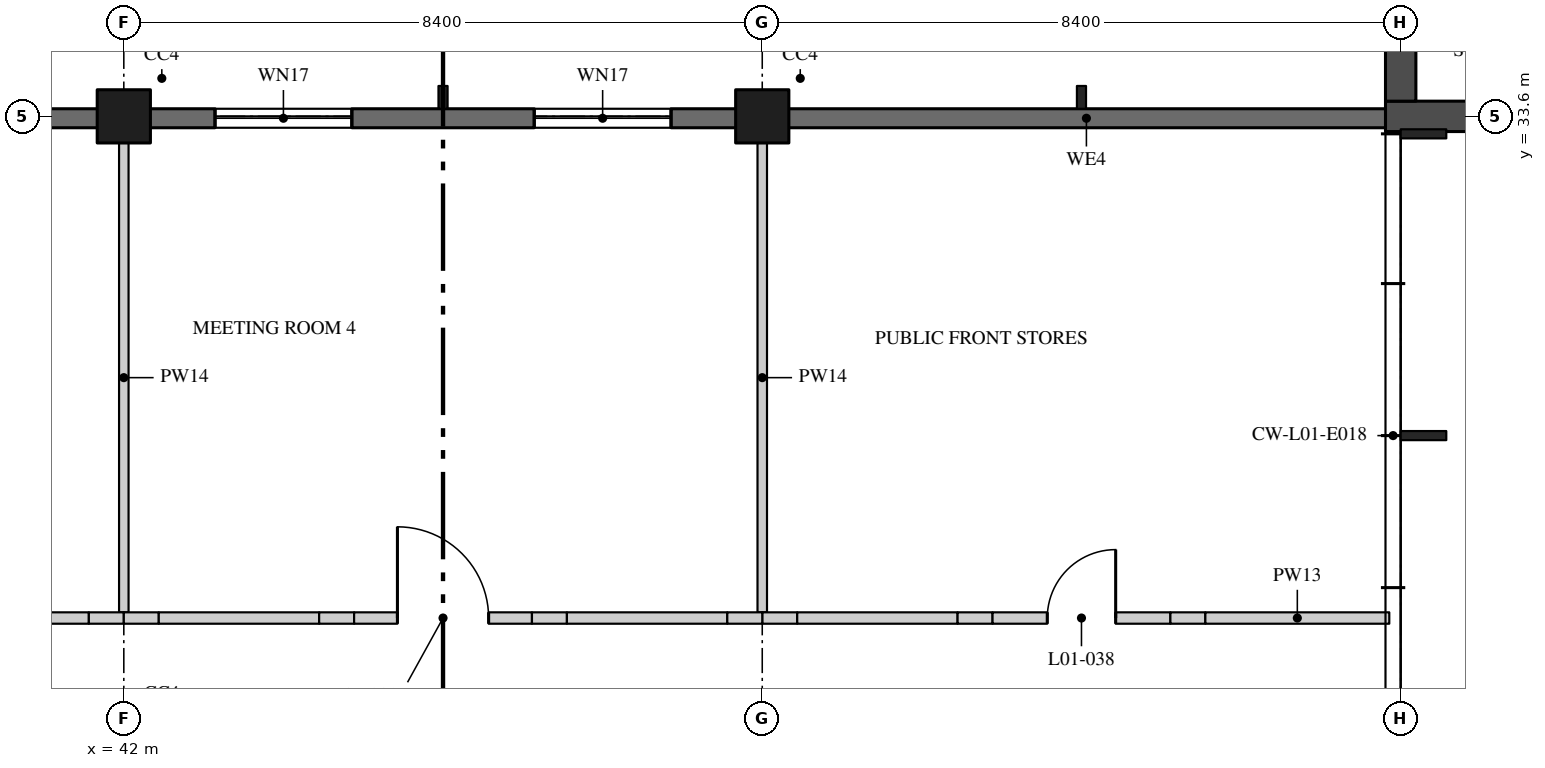
"""IFC4 building model, lengths in metres.
Left out: names, types, materials, properties, quantities, classifications, styles, units other than length and angle.
Written with IfcOpenShell. Run it as: python <this file> out.ifc"""

import sys

from ifc_helpers import new_model, si_unit, direction, frame, frame_2d, origin, origin_2d, place, context, subcontext, project, spatial, rectangle, extrude, element, fill, save


model = new_model("IFC4")
c1 = context("Model", 3, precision=1e-05, world=origin(), true_north=direction((0.0, 1.0)))
c2 = subcontext(c1, "Body", "Model", "MODEL_VIEW")
j1 = project(units=[si_unit("LENGTHUNIT", "METRE"), si_unit("PLANEANGLEUNIT", "RADIAN")], contexts=[c1])
p1 = place(None, origin())
s1 = spatial("IfcSite", under=j1, at=p1, CompositionType="ELEMENT")
p2 = place(p1, origin())
s2 = spatial("IfcBuilding", under=s1, at=p2, CompositionType="ELEMENT")
p3 = place(p2, frame((0.0, 0.0, 5.4)))
s3 = spatial("IfcBuildingStorey", under=s2, at=p3, CompositionType="ELEMENT", Elevation=5.4)
for number, where, z_axis, x_axis in (
    (1, (42.0, 33.6, 0.0), (0.0, 0.0, 1.0), (1.0, 0.0, 0.0)),
    (2, (50.4, 33.6, 0.0), (0.0, 0.0, 1.0), (1.0, 0.0, 0.0)),
):
    element("IfcColumn", number, at=place(p3, frame(where, z_axis=z_axis, x_axis=x_axis)), inside=s3, PredefinedType="COLUMN", context=c2, shape_type="SweptSolid", body=[
        extrude(rectangle(XDim=0.7, YDim=0.7, at=origin_2d()), origin(), (0.0, 0.0, 1.0), 4.37),
    ])
p4 = place(p3, frame((58.6, 33.6, 0.0), z_axis=(0.0, 0.0, 1.0), x_axis=(1.0, 0.0, 0.0)))
e3 = element("IfcWall", 3, at=p4, inside=s3, PredefinedType="SHEAR", context=c2, shape_type="SweptSolid", body=[
    extrude(rectangle(XDim=8.8, YDim=0.4, at=frame_2d((4.4, 0.0))), origin(), (0.0, 0.0, 1.0), 4.25),
])
p5 = place(p3, frame((58.8, 33.8, 0.0), z_axis=(0.0, 0.0, 1.0), x_axis=(0.0, 1.0, 0.0)))
e4 = element("IfcWall", 4, at=p5, inside=s3, PredefinedType="SHEAR", context=c2, shape_type="SweptSolid", body=[
    extrude(rectangle(XDim=8.0, YDim=0.4, at=frame_2d((4.0, 0.0))), origin(), (0.0, 0.0, 1.0), 4.25),
])
p6 = place(p3, frame((42.0, 27.075, 0.0), z_axis=(0.0, 0.0, 1.0), x_axis=(0.0, 1.0, 0.0)))
e5 = element("IfcWall", 5, at=p6, inside=s3, PredefinedType="PARTITIONING", context=c2, shape_type="SweptSolid", body=[
    extrude(rectangle(XDim=6.175, YDim=0.125, at=frame_2d((3.087, 0.0))), origin(), (0.0, 0.0, 1.0), 3.746),
])
p7 = place(p3, frame((39.43, 27.0, 0.0), z_axis=(0.0, 0.0, 1.0), x_axis=(1.0, 0.0, 0.0)))
e6 = element("IfcWall", 6, at=p7, inside=s3, PredefinedType="PARTITIONING", context=c2, shape_type="SweptSolid", body=[
    extrude(rectangle(XDim=2.11, YDim=0.15, at=frame_2d((1.055, 0.0))), origin(), (0.0, 0.0, 1.0), 4.37),
])
p8 = place(p3, frame((41.54, 27.0, 0.0), z_axis=(0.0, 0.0, 1.0), x_axis=(1.0, 0.0, 0.0)))
e7 = element("IfcWall", 7, at=p8, inside=s3, PredefinedType="PARTITIONING", context=c2, shape_type="SweptSolid", body=[
    extrude(rectangle(XDim=0.46, YDim=0.15, at=frame_2d((0.23, 0.0))), origin(), (0.0, 0.0, 1.0), 3.746),
])
p9 = place(p3, frame((50.4, 27.075, 0.0), z_axis=(0.0, 0.0, 1.0), x_axis=(0.0, 1.0, 0.0)))
e8 = element("IfcWall", 8, at=p9, inside=s3, PredefinedType="PARTITIONING", context=c2, shape_type="SweptSolid", body=[
    extrude(rectangle(XDim=6.175, YDim=0.125, at=frame_2d((3.087, 0.0))), origin(), (0.0, 0.0, 1.0), 3.746),
])
p10 = place(p3, frame((50.4, 27.0, 0.0), z_axis=(0.0, 0.0, 1.0), x_axis=(1.0, 0.0, 0.0)))
e9 = element("IfcWall", 9, at=p10, inside=s3, PredefinedType="PARTITIONING", context=c2, shape_type="SweptSolid", body=[
    extrude(rectangle(XDim=0.46, YDim=0.15, at=frame_2d((0.23, 0.0))), origin(), (0.0, 0.0, 1.0), 3.746),
])
p11 = place(p3, frame((50.86, 27.0, 0.0), z_axis=(0.0, 0.0, 1.0), x_axis=(1.0, 0.0, 0.0)))
e10 = element("IfcWall", 10, at=p11, inside=s3, PredefinedType="PARTITIONING", context=c2, shape_type="SweptSolid", body=[
    extrude(rectangle(XDim=2.11, YDim=0.15, at=frame_2d((1.055, 0.0))), origin(), (0.0, 0.0, 1.0), 4.37),
])
p12 = place(p3, frame((52.97, 27.0, 0.0), z_axis=(0.0, 0.0, 1.0), x_axis=(1.0, 0.0, 0.0)))
e11 = element("IfcWall", 11, at=p12, inside=s3, PredefinedType="PARTITIONING", context=c2, shape_type="SweptSolid", body=[
    extrude(rectangle(XDim=0.46, YDim=0.15, at=frame_2d((0.23, 0.0))), origin(), (0.0, 0.0, 1.0), 3.895),
])
p13 = place(p3, frame((53.43, 27.0, 0.0), z_axis=(0.0, 0.0, 1.0), x_axis=(1.0, 0.0, 0.0)))
e12 = element("IfcWall", 12, at=p13, inside=s3, PredefinedType="PARTITIONING", context=c2, shape_type="SweptSolid", body=[
    extrude(rectangle(XDim=2.34, YDim=0.15, at=frame_2d((1.17, 0.0))), origin(), (0.0, 0.0, 1.0), 4.37),
])
p14 = place(p13, frame((0.72, 0.0, 0.0)))
e13 = element("IfcOpeningElement", 13, at=p14, cuts=e12, PredefinedType="OPENING", context=c2, shape_type="SweptSolid", body=[
    extrude(rectangle(XDim=0.9, YDim=2.1, at=frame_2d((0.45, 1.05))), frame((0.0, 0.085, 0.0), z_axis=(0.0, -1.0, 0.0), x_axis=(1.0, 0.0, 0.0)), (0.0, 0.0, 1.0), 0.17),
])
p15 = place(p3, frame((55.77, 27.0, 0.0), z_axis=(0.0, 0.0, 1.0), x_axis=(1.0, 0.0, 0.0)))
e14 = element("IfcWall", 14, at=p15, inside=s3, PredefinedType="PARTITIONING", context=c2, shape_type="SweptSolid", body=[
    extrude(rectangle(XDim=0.46, YDim=0.15, at=frame_2d((0.23, 0.0))), origin(), (0.0, 0.0, 1.0), 3.895),
])
p16 = place(p3, frame((56.23, 27.0, 0.0), z_axis=(0.0, 0.0, 1.0), x_axis=(1.0, 0.0, 0.0)))
e15 = element("IfcWall", 15, at=p16, inside=s3, PredefinedType="PARTITIONING", context=c2, shape_type="SweptSolid", body=[
    extrude(rectangle(XDim=2.42, YDim=0.15, at=frame_2d((1.21, 0.0))), origin(), (0.0, 0.0, 1.0), 4.37),
])
p17 = place(p3, frame((42.0, 27.0, 0.0), z_axis=(0.0, 0.0, 1.0), x_axis=(1.0, 0.0, 0.0)))
e16 = element("IfcWall", 16, at=p17, inside=s3, PredefinedType="PARTITIONING", context=c2, shape_type="SweptSolid", body=[
    extrude(rectangle(XDim=0.46, YDim=0.15, at=frame_2d((0.23, 0.0))), origin(), (0.0, 0.0, 1.0), 3.746),
])
p18 = place(p3, frame((42.46, 27.0, 0.0), z_axis=(0.0, 0.0, 1.0), x_axis=(1.0, 0.0, 0.0)))
e17 = element("IfcWall", 17, at=p18, inside=s3, PredefinedType="PARTITIONING", context=c2, shape_type="SweptSolid", body=[
    extrude(rectangle(XDim=2.11, YDim=0.15, at=frame_2d((1.055, 0.0))), origin(), (0.0, 0.0, 1.0), 4.37),
])
p19 = place(p3, frame((44.57, 27.0, 0.0), z_axis=(0.0, 0.0, 1.0), x_axis=(1.0, 0.0, 0.0)))
e18 = element("IfcWall", 18, at=p19, inside=s3, PredefinedType="PARTITIONING", context=c2, shape_type="SweptSolid", body=[
    extrude(rectangle(XDim=0.46, YDim=0.15, at=frame_2d((0.23, 0.0))), origin(), (0.0, 0.0, 1.0), 3.895),
])
p20 = place(p3, frame((45.03, 27.0, 0.0), z_axis=(0.0, 0.0, 1.0), x_axis=(1.0, 0.0, 0.0)))
e19 = element("IfcWall", 19, at=p20, inside=s3, PredefinedType="PARTITIONING", context=c2, shape_type="SweptSolid", body=[
    extrude(rectangle(XDim=2.34, YDim=0.15, at=frame_2d((1.17, 0.0))), origin(), (0.0, 0.0, 1.0), 4.37),
])
p21 = place(p20, frame((0.57, 0.0, 0.0)))
e20 = element("IfcOpeningElement", 20, at=p21, cuts=e19, PredefinedType="OPENING", context=c2, shape_type="SweptSolid", body=[
    extrude(rectangle(XDim=1.2, YDim=2.4, at=frame_2d((0.6, 1.2))), frame((0.0, 0.085, 0.0), z_axis=(0.0, -1.0, 0.0), x_axis=(1.0, 0.0, 0.0)), (0.0, 0.0, 1.0), 0.17),
])
p22 = place(p3, frame((47.37, 27.0, 0.0), z_axis=(0.0, 0.0, 1.0), x_axis=(1.0, 0.0, 0.0)))
e21 = element("IfcWall", 21, at=p22, inside=s3, PredefinedType="PARTITIONING", context=c2, shape_type="SweptSolid", body=[
    extrude(rectangle(XDim=0.46, YDim=0.15, at=frame_2d((0.23, 0.0))), origin(), (0.0, 0.0, 1.0), 3.895),
])
p23 = place(p3, frame((47.83, 27.0, 0.0), z_axis=(0.0, 0.0, 1.0), x_axis=(1.0, 0.0, 0.0)))
e22 = element("IfcWall", 22, at=p23, inside=s3, PredefinedType="PARTITIONING", context=c2, shape_type="SweptSolid", body=[
    extrude(rectangle(XDim=2.11, YDim=0.15, at=frame_2d((1.055, 0.0))), origin(), (0.0, 0.0, 1.0), 4.37),
])
p24 = place(p3, frame((49.94, 27.0, 0.0), z_axis=(0.0, 0.0, 1.0), x_axis=(1.0, 0.0, 0.0)))
e23 = element("IfcWall", 23, at=p24, inside=s3, PredefinedType="PARTITIONING", context=c2, shape_type="SweptSolid", body=[
    extrude(rectangle(XDim=0.46, YDim=0.15, at=frame_2d((0.23, 0.0))), origin(), (0.0, 0.0, 1.0), 3.746),
])
p25 = place(p3, frame((58.6, 33.575, 0.0), z_axis=(0.0, 0.0, 1.0), x_axis=(-1.0, 0.0, 0.0)))
e24 = element("IfcWall", 24, at=p25, inside=s3, PredefinedType="SOLIDWALL", context=c2, shape_type="SweptSolid", body=[
    extrude(rectangle(XDim=7.87, YDim=0.25, at=frame_2d((3.935, 0.0))), origin(), (0.0, 0.0, 1.0), 3.746),
])
p26 = place(p3, frame((50.07, 33.575, 0.0), z_axis=(0.0, 0.0, 1.0), x_axis=(-1.0, 0.0, 0.0)))
e25 = element("IfcWall", 25, at=p26, inside=s3, PredefinedType="SOLIDWALL", context=c2, shape_type="SweptSolid", body=[
    extrude(rectangle(XDim=7.74, YDim=0.25, at=frame_2d((3.87, 0.0))), origin(), (0.0, 0.0, 1.0), 3.746),
])
p27 = place(p26, frame((0.87, 0.0, 0.9)))
e26 = element("IfcOpeningElement", 26, at=p27, cuts=e25, PredefinedType="OPENING", context=c2, shape_type="SweptSolid", body=[
    extrude(rectangle(XDim=1.8, YDim=2.4, at=frame_2d((0.9, 1.2))), frame((0.0, 0.135, 0.0), z_axis=(0.0, -1.0, 0.0), x_axis=(1.0, 0.0, 0.0)), (0.0, 0.0, 1.0), 0.27),
])
p28 = place(p26, frame((5.07, 0.0, 0.9)))
e27 = element("IfcOpeningElement", 27, at=p28, cuts=e25, PredefinedType="OPENING", context=c2, shape_type="SweptSolid", body=[
    extrude(rectangle(XDim=1.8, YDim=2.4, at=frame_2d((0.9, 1.2))), frame((0.0, 0.135, 0.0), z_axis=(0.0, -1.0, 0.0), x_axis=(1.0, 0.0, 0.0)), (0.0, 0.0, 1.0), 0.27),
])
p29 = place(p3, frame((41.67, 33.575, 0.0), z_axis=(0.0, 0.0, 1.0), x_axis=(-1.0, 0.0, 0.0)))
e28 = element("IfcWall", 28, at=p29, inside=s3, PredefinedType="SOLIDWALL", context=c2, shape_type="SweptSolid", body=[
    extrude(rectangle(XDim=7.69, YDim=0.25, at=frame_2d((3.845, 0.0))), origin(), (0.0, 0.0, 1.0), 3.746),
])
p30 = place(p29, frame((0.87, 0.0, 0.9)))
e29 = element("IfcOpeningElement", 29, at=p30, cuts=e28, PredefinedType="OPENING", context=c2, shape_type="SweptSolid", body=[
    extrude(rectangle(XDim=1.8, YDim=2.4, at=frame_2d((0.9, 1.2))), frame((0.0, 0.135, 0.0), z_axis=(0.0, -1.0, 0.0), x_axis=(1.0, 0.0, 0.0)), (0.0, 0.0, 1.0), 0.27),
])
p31 = place(p29, frame((4.77, 0.0, 0.9)))
e30 = element("IfcOpeningElement", 30, at=p31, cuts=e28, PredefinedType="OPENING", context=c2, shape_type="SweptSolid", body=[
    extrude(rectangle(XDim=2.4, YDim=2.4, at=frame_2d((1.2, 1.2))), frame((0.0, 0.135, 0.0), z_axis=(0.0, -1.0, 0.0), x_axis=(1.0, 0.0, 0.0)), (0.0, 0.0, 1.0), 0.27),
])
p32 = place(p14, origin())
e31 = element("IfcDoor", 31, at=p32, inside=s3, OperationType="SINGLE_SWING_LEFT", PredefinedType="DOOR", context=c2, shape_type="SweptSolid", body=[
    extrude(rectangle(XDim=0.9, YDim=2.1, at=frame_2d((0.45, 1.05))), frame((0.0, 0.025, 0.0), z_axis=(0.0, -1.0, 0.0), x_axis=(1.0, 0.0, 0.0)), (0.0, 0.0, 1.0), 0.05),
])
fill(e13, e31)
p33 = place(p21, origin())
e32 = element("IfcDoor", 32, at=p33, inside=s3, OperationType="SINGLE_SWING_RIGHT", PredefinedType="DOOR", context=c2, shape_type="SweptSolid", body=[
    extrude(rectangle(XDim=1.2, YDim=2.4, at=frame_2d((0.6, 1.2))), frame((0.0, 0.025, 0.0), z_axis=(0.0, -1.0, 0.0), x_axis=(1.0, 0.0, 0.0)), (0.0, 0.0, 1.0), 0.05),
])
fill(e20, e32)
p34 = place(p27, origin())
e33 = element("IfcWindow", 33, at=p34, inside=s3, PartitioningType="SINGLE_PANEL", PredefinedType="WINDOW", context=c2, shape_type="SweptSolid", body=[
    extrude(rectangle(XDim=1.8, YDim=2.4, at=frame_2d((0.9, 1.2))), frame((0.0, 0.03, 0.0), z_axis=(0.0, -1.0, 0.0), x_axis=(1.0, 0.0, 0.0)), (0.0, 0.0, 1.0), 0.06),
])
fill(e26, e33)
p35 = place(p28, origin())
e34 = element("IfcWindow", 34, at=p35, inside=s3, PartitioningType="SINGLE_PANEL", PredefinedType="WINDOW", context=c2, shape_type="SweptSolid", body=[
    extrude(rectangle(XDim=1.8, YDim=2.4, at=frame_2d((0.9, 1.2))), frame((0.0, 0.03, 0.0), z_axis=(0.0, -1.0, 0.0), x_axis=(1.0, 0.0, 0.0)), (0.0, 0.0, 1.0), 0.06),
])
fill(e27, e34)
save(model, sys.argv[1])
